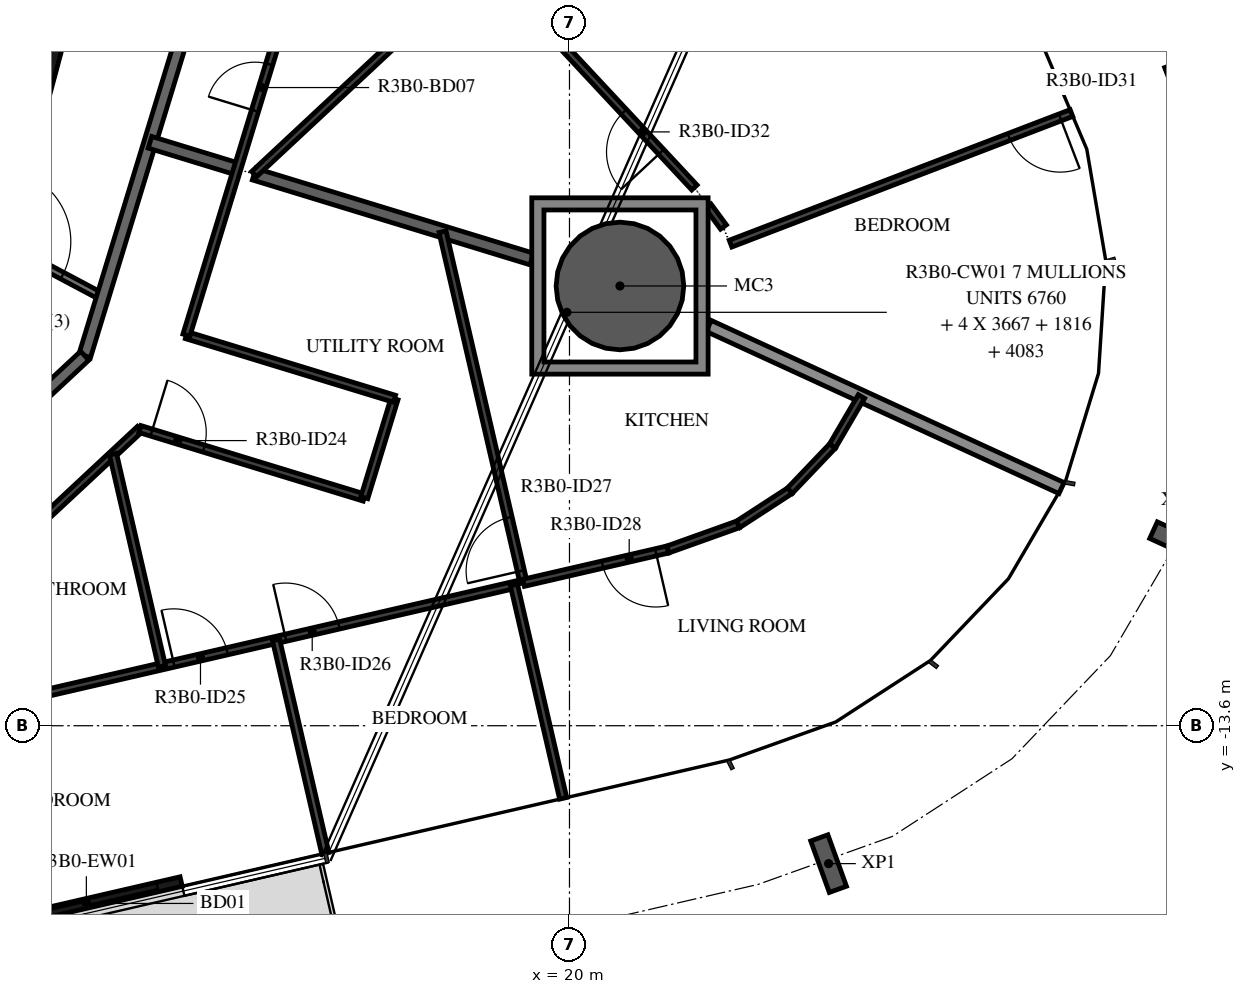
"""IFC4 building model, lengths in metres.
Left out: names, types, materials, properties, quantities, classifications, styles, units other than length and angle.
Written with IfcOpenShell. Run it as: python <this file> out.ifc"""

import sys

from ifc_helpers import new_model, si_unit, direction, frame, frame_2d, origin, origin_2d, place, context, subcontext, project, spatial, polyline, rectangle, hollow_circle, i_section, outline, extrude, element, fill, save


model = new_model("IFC4")
c1 = context("Model", 3, precision=1e-05, world=origin(), true_north=direction((0.0, 1.0)))
c2 = subcontext(c1, "Body", "Model", "MODEL_VIEW")
j1 = project(units=[si_unit("LENGTHUNIT", "METRE"), si_unit("PLANEANGLEUNIT", "RADIAN")], contexts=[c1])
p1 = place(None, origin())
s1 = spatial("IfcSite", under=j1, at=p1, CompositionType="ELEMENT")
p2 = place(p1, origin())
s2 = spatial("IfcBuilding", under=s1, at=p2, CompositionType="ELEMENT")
p3 = place(p2, frame((0.0, 0.0, 127.4)))
s3 = spatial("IfcBuildingStorey", under=s2, at=p3, CompositionType="ELEMENT", Elevation=127.4)
p4 = place(p3, frame((20.83, -6.368, -0.38), z_axis=(0.0, 0.0, 1.0), x_axis=(1.0, 0.0, 0.0)))
e1 = element("IfcColumn", 1, at=p4, inside=s3, PredefinedType="COLUMN", context=c2, shape_type="SweptSolid", body=[
    extrude(hollow_circle(Radius=1.05, WallThickness=0.05, at=origin_2d()), origin(), (0.0, 0.0, 1.0), 3.5),
])
for number, where, z_axis, x_axis in (
    (2, (24.261, -15.868, -0.38), (0.0, 0.0, 1.0), (-0.941, -0.34, 0.0)),
    (3, (30.014, -10.571, -0.38), (0.0, 0.0, 1.0), (-0.416, -0.909, 0.0)),
    (4, (30.262, -2.756, -0.38), (0.0, 0.0, 1.0), (0.358, -0.934, 0.0)),
):
    element("IfcColumn", number, at=place(p3, frame(where, z_axis=z_axis, x_axis=x_axis)), inside=s3, PredefinedType="COLUMN", context=c2, shape_type="SweptSolid", body=[
        extrude(i_section(OverallWidth=0.3, OverallDepth=0.9, WebThickness=0.019, FlangeThickness=0.035, FilletRadius=0.03, at=origin_2d()), origin(), (0.0, 0.0, 1.0), 3.5),
    ])
p5 = place(p3, frame((10.496, -16.883, 0.0), z_axis=(0.0, 0.0, 1.0), x_axis=(0.974364187477, 0.224976510247, 0.0)))
e5 = element("IfcWall", 5, at=p5, inside=s3, PredefinedType="STANDARD", context=c2, shape_type="SweptSolid", body=[
    extrude(rectangle(XDim=3.2, YDim=0.16, at=frame_2d((1.6, 0.0))), origin(), (0.0, 0.0, 1.0), 3.12),
])
p6 = place(p5, frame((0.4, 0.0, 0.0)))
e6 = element("IfcOpeningElement", 6, at=p6, cuts=e5, PredefinedType="OPENING", context=c2, shape_type="SweptSolid", body=[
    extrude(rectangle(XDim=2.4, YDim=2.4, at=frame_2d((1.2, 1.2))), frame((0.0, 0.09, 0.0), z_axis=(0.0, -1.0, 0.0), x_axis=(1.0, 0.0, 0.0)), (0.0, 0.0, 1.0), 0.18),
])
p7 = place(p3, frame((10.858, -4.479, 0.0), z_axis=(0.0, 0.0, 1.0), x_axis=(0.258734743916, 0.965948410781, 0.0)))
e7 = element("IfcWall", 7, at=p7, inside=s3, PredefinedType="SHEAR", context=c2, shape_type="SweptSolid", body=[
    extrude(rectangle(XDim=3.033, YDim=0.5, at=frame_2d((1.516, 0.0))), origin(), (0.0, 0.0, 1.0), 3.12),
])
p8 = place(p3, frame((10.511, -5.589, 0.0), z_axis=(0.0, 0.0, 1.0), x_axis=(0.882987820808, -0.469395897196, 0.0)))
e8 = element("IfcWall", 8, at=p8, inside=s3, PredefinedType="PARTITIONING", context=c2, shape_type="SweptSolid", body=[
    extrude(rectangle(XDim=2.052, YDim=0.12, at=frame_2d((1.026, 0.0))), origin(), (0.0, 0.0, 1.0), 3.12),
])
p9 = place(p8, frame((0.1, 0.0, 0.0)))
e9 = element("IfcOpeningElement", 9, at=p9, cuts=e8, PredefinedType="OPENING", context=c2, shape_type="SweptSolid", body=[
    extrude(rectangle(XDim=1.2, YDim=2.1, at=frame_2d((0.6, 1.05))), frame((0.0, 0.07, 0.0), z_axis=(0.0, -1.0, 0.0), x_axis=(1.0, 0.0, 0.0)), (0.0, 0.0, 1.0), 0.14),
])
p10 = place(p3, frame((12.028, -7.516, 0.0), z_axis=(0.0, 0.0, 1.0), x_axis=(0.292365533182, 0.956306642771, 0.0)))
e10 = element("IfcWall", 10, at=p10, inside=s3, PredefinedType="STANDARD", context=c2, shape_type="SweptSolid", body=[
    extrude(rectangle(XDim=7.342, YDim=0.2, at=frame_2d((3.671, 0.0))), origin(), (0.0, 0.0, 1.0), 3.12),
])
p11 = place(p3, frame((6.659, -12.523, 0.0), z_axis=(0.0, 0.0, 1.0), x_axis=(0.731350455479, 0.682001841105, 0.0)))
e11 = element("IfcWall", 11, at=p11, inside=s3, PredefinedType="STANDARD", context=c2, shape_type="SweptSolid", body=[
    extrude(rectangle(XDim=7.342, YDim=0.2, at=frame_2d((3.671, 0.0))), origin(), (0.0, 0.0, 1.0), 3.12),
])
p12 = place(p11, frame((0.597, 0.0, 0.0)))
e12 = element("IfcOpeningElement", 12, at=p12, cuts=e11, PredefinedType="OPENING", context=c2, shape_type="SweptSolid", body=[
    extrude(rectangle(XDim=1.0, YDim=2.1, at=frame_2d((0.5, 1.05))), frame((0.0, 0.11, 0.0), z_axis=(0.0, -1.0, 0.0), x_axis=(1.0, 0.0, 0.0)), (0.0, 0.0, 1.0), 0.22),
])
p13 = place(p3, frame((14.536, -4.444, 0.0), z_axis=(0.0, 0.0, 1.0), x_axis=(-0.956326299111, 0.292301230974, 0.0)))
e13 = element("IfcWall", 13, at=p13, inside=s3, PredefinedType="STANDARD", context=c2, shape_type="SweptSolid", body=[
    extrude(rectangle(XDim=1.5, YDim=0.2, at=frame_2d((0.75, 0.0))), origin(), (0.0, 0.0, 1.0), 3.12),
])
p14 = place(p3, frame((19.38, -5.925, 0.0), z_axis=(0.0, 0.0, 1.0), x_axis=(-0.956301542054, 0.29238221674, 0.0)))
e14 = element("IfcWall", 14, at=p14, inside=s3, PredefinedType="STANDARD", context=c2, shape_type="SweptSolid", body=[
    extrude(rectangle(XDim=4.775, YDim=0.2, at=frame_2d((2.387, 0.0))), origin(), (0.0, 0.0, 1.0), 3.12),
])
p15 = place(p3, frame((28.092, -9.692, 0.0), z_axis=(0.0, 0.0, 1.0), x_axis=(-0.908656456134, 0.417544542206, 0.0)))
e15 = element("IfcWall", 15, at=p15, inside=s3, PredefinedType="STANDARD", context=c2, shape_type="SweptSolid", body=[
    extrude(rectangle(XDim=6.385, YDim=0.2, at=frame_2d((3.192, 0.0))), origin(), (0.0, 0.0, 1.0), 2.73),
])
p16 = place(p3, frame((-13.939, -18.911, 0.0), z_axis=(0.0, 0.0, 1.0), x_axis=(0.974369607456, 0.224953035245, 0.0)))
e16 = element("IfcWall", 16, at=p16, inside=s3, PredefinedType="PARTITIONING", context=c2, shape_type="SweptSolid", body=[
    extrude(rectangle(XDim=33.934, YDim=0.12, at=frame_2d((16.967, 0.0))), origin(), (0.0, 0.0, 1.0), 3.12),
])
p17 = place(p16, frame((2.0, 0.0, 0.0)))
e17 = element("IfcOpeningElement", 17, at=p17, cuts=e16, PredefinedType="OPENING", context=c2, shape_type="SweptSolid", body=[
    extrude(rectangle(XDim=0.9, YDim=2.1, at=frame_2d((0.45, 1.05))), frame((0.0, 0.07, 0.0), z_axis=(0.0, -1.0, 0.0), x_axis=(1.0, 0.0, 0.0)), (0.0, 0.0, 1.0), 0.14),
])
p18 = place(p16, frame((28.154, 0.0, 0.0)))
e18 = element("IfcOpeningElement", 18, at=p18, cuts=e16, PredefinedType="OPENING", context=c2, shape_type="SweptSolid", body=[
    extrude(rectangle(XDim=0.9, YDim=2.1, at=frame_2d((0.45, 1.05))), frame((0.0, 0.07, 0.0), z_axis=(0.0, -1.0, 0.0), x_axis=(1.0, 0.0, 0.0)), (0.0, 0.0, 1.0), 0.14),
])
p19 = place(p16, frame((30.039, 0.0, 0.0)))
e19 = element("IfcOpeningElement", 19, at=p19, cuts=e16, PredefinedType="OPENING", context=c2, shape_type="SweptSolid", body=[
    extrude(rectangle(XDim=0.9, YDim=2.1, at=frame_2d((0.45, 1.05))), frame((0.0, 0.07, 0.0), z_axis=(0.0, -1.0, 0.0), x_axis=(1.0, 0.0, 0.0)), (0.0, 0.0, 1.0), 0.14),
])
p20 = place(p3, frame((7.388, -13.894, 0.0), z_axis=(0.0, 0.0, 1.0), x_axis=(0.731346321845, 0.682006273815, 0.0)))
e20 = element("IfcWall", 20, at=p20, inside=s3, PredefinedType="PARTITIONING", context=c2, shape_type="SweptSolid", body=[
    extrude(rectangle(XDim=7.585, YDim=0.12, at=frame_2d((3.793, 0.0))), origin(), (0.0, 0.0, 1.0), 3.12),
])
p21 = place(p20, frame((1.3, 0.0, 0.0)))
e21 = element("IfcOpeningElement", 21, at=p21, cuts=e20, PredefinedType="OPENING", context=c2, shape_type="SweptSolid", body=[
    extrude(rectangle(XDim=0.8, YDim=2.1, at=frame_2d((0.4, 1.05))), frame((0.0, 0.07, 0.0), z_axis=(0.0, -1.0, 0.0), x_axis=(1.0, 0.0, 0.0)), (0.0, 0.0, 1.0), 0.14),
])
p22 = place(p3, frame((12.935, -8.721, 0.0), z_axis=(0.0, 0.0, 1.0), x_axis=(0.956306865441, -0.292364804843, 0.0)))
e22 = element("IfcWall", 22, at=p22, inside=s3, PredefinedType="PARTITIONING", context=c2, shape_type="SweptSolid", body=[
    extrude(rectangle(XDim=3.859, YDim=0.12, at=frame_2d((1.929, 0.0))), origin(), (0.0, 0.0, 1.0), 3.12),
])
p23 = place(p22, frame((0.2, 0.0, 0.0)))
e23 = element("IfcOpeningElement", 23, at=p23, cuts=e22, PredefinedType="OPENING", context=c2, shape_type="SweptSolid", body=[
    extrude(rectangle(XDim=0.9, YDim=2.1, at=frame_2d((0.45, 1.05))), frame((0.0, 0.07, 0.0), z_axis=(0.0, -1.0, 0.0), x_axis=(1.0, 0.0, 0.0)), (0.0, 0.0, 1.0), 0.14),
])
p24 = place(p3, frame((16.625, -9.849, 0.0), z_axis=(0.0, 0.0, 1.0), x_axis=(0.292390011609, 0.956299158795, 0.0)))
e24 = element("IfcWall", 24, at=p24, inside=s3, PredefinedType="PARTITIONING", context=c2, shape_type="SweptSolid", body=[
    extrude(rectangle(XDim=1.7, YDim=0.12, at=frame_2d((0.85, 0.0))), origin(), (0.0, 0.0, 1.0), 3.12),
])
p25 = place(p3, frame((17.123, -8.223, 0.0), z_axis=(0.0, 0.0, 1.0), x_axis=(-0.956299657224, 0.292388381428, 0.0)))
e25 = element("IfcWall", 25, at=p25, inside=s3, PredefinedType="PARTITIONING", context=c2, shape_type="SweptSolid", body=[
    extrude(rectangle(XDim=3.579, YDim=0.12, at=frame_2d((1.79, 0.0))), origin(), (0.0, 0.0, 1.0), 3.12),
])
p26 = place(p3, frame((13.7, -7.177, 0.0), z_axis=(0.0, 0.0, 1.0), x_axis=(0.292382309758, 0.956301513614, 0.0)))
e26 = element("IfcWall", 26, at=p26, inside=s3, PredefinedType="PARTITIONING", context=c2, shape_type="SweptSolid", body=[
    extrude(rectangle(XDim=6.93, YDim=0.12, at=frame_2d((3.465, 0.0))), origin(), (0.0, 0.0, 1.0), 3.12),
])
p27 = place(p26, frame((3.858, 0.0, 0.0)))
e27 = element("IfcOpeningElement", 27, at=p27, cuts=e26, PredefinedType="OPENING", context=c2, shape_type="SweptSolid", body=[
    extrude(rectangle(XDim=0.8, YDim=2.1, at=frame_2d((0.4, 1.05))), frame((0.0, 0.07, 0.0), z_axis=(0.0, -1.0, 0.0), x_axis=(1.0, 0.0, 0.0)), (0.0, 0.0, 1.0), 0.14),
])
p28 = place(p3, frame((15.985, -15.698, 0.0), z_axis=(0.0, 0.0, 1.0), x_axis=(-0.224943703639, 0.9743717618, 0.0)))
e28 = element("IfcWall", 28, at=p28, inside=s3, PredefinedType="PARTITIONING", context=c2, shape_type="SweptSolid", body=[
    extrude(rectangle(XDim=3.6, YDim=0.12, at=frame_2d((1.8, 0.0))), origin(), (0.0, 0.0, 1.0), 2.73),
])
p29 = place(p3, frame((13.298, -12.623, 0.0), z_axis=(0.0, 0.0, 1.0), x_axis=(-0.22499394936, 0.974360160696, 0.0)))
e29 = element("IfcWall", 29, at=p29, inside=s3, PredefinedType="PARTITIONING", context=c2, shape_type="SweptSolid", body=[
    extrude(rectangle(XDim=3.581, YDim=0.12, at=frame_2d((1.791, 0.0))), origin(), (0.0, 0.0, 1.0), 3.12),
])
p30 = place(p3, frame((19.896, -14.794, 0.0), z_axis=(0.0, 0.0, 1.0), x_axis=(-0.224958568294, 0.974368330023, 0.0)))
e30 = element("IfcWall", 30, at=p30, inside=s3, PredefinedType="PARTITIONING", context=c2, shape_type="SweptSolid", body=[
    extrude(rectangle(XDim=3.6, YDim=0.12, at=frame_2d((1.8, 0.0))), origin(), (0.0, 0.0, 1.0), 3.12),
])
p31 = place(p3, frame((19.245, -11.25, 0.0), z_axis=(0.0, 0.0, 1.0), x_axis=(-0.224958805164, 0.974368275335, 0.0)))
e31 = element("IfcWall", 31, at=p31, inside=s3, PredefinedType="PARTITIONING", context=c2, shape_type="SweptSolid", body=[
    extrude(rectangle(XDim=5.926, YDim=0.12, at=frame_2d((2.963, 0.0))), origin(), (0.0, 0.0, 1.0), 3.12),
])
p32 = place(p31, frame((0.2, 0.0, 0.0)))
e32 = element("IfcOpeningElement", 32, at=p32, cuts=e31, PredefinedType="OPENING", context=c2, shape_type="SweptSolid", body=[
    extrude(rectangle(XDim=0.9, YDim=2.1, at=frame_2d((0.45, 1.05))), frame((0.0, 0.07, 0.0), z_axis=(0.0, -1.0, 0.0), x_axis=(1.0, 0.0, 0.0)), (0.0, 0.0, 1.0), 0.14),
])
p33 = place(p3, frame((24.802, -8.186, 0.0), z_axis=(0.0, 0.0, 1.0), x_axis=(-0.505043103481, -0.863094122113, 0.0)))
e33 = element("IfcWall", 33, at=p33, inside=s3, PredefinedType="PARTITIONING", context=c2, shape_type="SweptSolid", body=[
    extrude(rectangle(XDim=0.945, YDim=0.12, at=frame_2d((0.473, 0.0))), origin(), (0.0, 0.0, 1.0), 3.12),
])
for number, where, z_axis, x_axis in (
    (34, (24.324, -9.002, 0.0), (0.0, 0.0, 1.0), (-0.69, -0.723, 0.0)),
    (35, (23.623, -9.737, 0.0), (0.0, 0.0, 1.0), (-0.839, -0.545, 0.0)),
):
    element("IfcWall", number, at=place(p3, frame(where, z_axis=z_axis, x_axis=x_axis)), inside=s3, PredefinedType="PARTITIONING", context=c2, shape_type="SweptSolid", body=[
        extrude(rectangle(XDim=1.016, YDim=0.12, at=frame_2d((0.508, 0.0))), origin(), (0.0, 0.0, 1.0), 3.12),
    ])
p34 = place(p3, frame((22.771, -10.29, 0.0), z_axis=(0.0, 0.0, 1.0), x_axis=(-0.941701391526, -0.336449831623, 0.0)))
e36 = element("IfcWall", 36, at=p34, inside=s3, PredefinedType="PARTITIONING", context=c2, shape_type="SweptSolid", body=[
    extrude(rectangle(XDim=1.227, YDim=0.12, at=frame_2d((0.614, 0.0))), origin(), (0.0, 0.0, 1.0), 3.12),
])
p35 = place(p3, frame((21.615, -10.703, 0.0), z_axis=(0.0, 0.0, 1.0), x_axis=(-0.974359049184, -0.224998762825, 0.0)))
e37 = element("IfcWall", 37, at=p35, inside=s3, PredefinedType="PARTITIONING", context=c2, shape_type="SweptSolid", body=[
    extrude(rectangle(XDim=2.433, YDim=0.12, at=frame_2d((1.216, 0.0))), origin(), (0.0, 0.0, 1.0), 3.12),
])
p36 = place(p35, frame((0.2, 0.0, 0.0)))
e38 = element("IfcOpeningElement", 38, at=p36, cuts=e37, PredefinedType="OPENING", context=c2, shape_type="SweptSolid", body=[
    extrude(rectangle(XDim=0.9, YDim=2.1, at=frame_2d((0.45, 1.05))), frame((0.0, 0.07, 0.0), z_axis=(0.0, -1.0, 0.0), x_axis=(1.0, 0.0, 0.0)), (0.0, 0.0, 1.0), 0.14),
])
p37 = place(p3, frame((28.255, -3.525, 0.0), z_axis=(0.0, 0.0, 1.0), x_axis=(-0.933839412031, -0.357692539114, 0.0)))
e39 = element("IfcWall", 39, at=p37, inside=s3, PredefinedType="PARTITIONING", context=c2, shape_type="SweptSolid", body=[
    extrude(rectangle(XDim=6.004, YDim=0.12, at=frame_2d((3.002, 0.0))), origin(), (0.0, 0.0, 1.0), 2.73),
])
p38 = place(p37, frame((0.2, 0.0, 0.0)))
e40 = element("IfcOpeningElement", 40, at=p38, cuts=e39, PredefinedType="OPENING", context=c2, shape_type="SweptSolid", body=[
    extrude(rectangle(XDim=0.9, YDim=2.1, at=frame_2d((0.45, 1.05))), frame((0.0, 0.07, 0.0), z_axis=(0.0, -1.0, 0.0), x_axis=(1.0, 0.0, 0.0)), (0.0, 0.0, 1.0), 0.14),
])
p39 = place(p3, frame((22.532, -5.399, 0.0), z_axis=(0.0, 0.0, 1.0), x_axis=(-0.592456078431, 0.805602752683, 0.0)))
e41 = element("IfcWall", 41, at=p39, inside=s3, PredefinedType="PARTITIONING", context=c2, shape_type="SweptSolid", body=[
    extrude(rectangle(XDim=0.426, YDim=0.12, at=frame_2d((0.213, 0.0))), origin(), (0.0, 0.0, 1.0), 3.12),
])
p40 = place(p3, frame((18.577, -1.02, 0.0), z_axis=(0.0, 0.0, 1.0), x_axis=(-0.731348673524, -0.682003751994, 0.0)))
e42 = element("IfcWall", 42, at=p40, inside=s3, PredefinedType="PARTITIONING", context=c2, shape_type="SweptSolid", body=[
    extrude(rectangle(XDim=5.146, YDim=0.12, at=frame_2d((2.573, 0.0))), origin(), (0.0, 0.0, 1.0), 3.12),
])
p41 = place(p3, frame((22.054, -4.749, 0.0), z_axis=(0.0, 0.0, 1.0), x_axis=(-0.682014558945, 0.731338595582, 0.0)))
e43 = element("IfcWall", 43, at=p41, inside=s3, PredefinedType="PARTITIONING", context=c2, shape_type="SweptSolid", body=[
    extrude(rectangle(XDim=10.399, YDim=0.12, at=frame_2d((5.2, 0.0))), origin(), (0.0, 0.0, 1.0), 3.12),
])
p42 = place(p41, frame((0.8, 0.0, 0.0)))
e44 = element("IfcOpeningElement", 44, at=p42, cuts=e43, PredefinedType="OPENING", context=c2, shape_type="SweptSolid", body=[
    extrude(rectangle(XDim=0.9, YDim=2.1, at=frame_2d((0.45, 1.05))), frame((0.0, 0.07, 0.0), z_axis=(0.0, -1.0, 0.0), x_axis=(1.0, 0.0, 0.0)), (0.0, 0.0, 1.0), 0.14),
])
p43 = place(p3, origin())
e45 = element("IfcWall", 45, at=p43, inside=s3, PredefinedType="STANDARD", context=c2, shape_type="SweptSolid", body=[
    extrude(outline(polyline([(22.28, -4.918), (22.28, -7.818), (19.38, -7.818), (19.38, -4.918), (22.28, -4.918)]), holes=[polyline([(19.58, -7.618), (22.08, -7.618), (22.08, -5.118), (19.58, -5.118), (19.58, -7.618)])]), origin(), (0.0, 0.0, 1.0), 3.12),
])
p44 = place(p6, origin())
e46 = element("IfcDoor", 46, at=p44, inside=s3, OperationType="DOUBLE_DOOR_SLIDING", PredefinedType="DOOR", context=c2, shape_type="SweptSolid", body=[
    extrude(rectangle(XDim=2.4, YDim=2.4, at=frame_2d((1.2, 1.2))), frame((0.0, 0.025, 0.0), z_axis=(0.0, -1.0, 0.0), x_axis=(1.0, 0.0, 0.0)), (0.0, 0.0, 1.0), 0.05),
])
fill(e6, e46)
p45 = place(p23, origin())
e47 = element("IfcDoor", 47, at=p45, inside=s3, OperationType="SINGLE_SWING_RIGHT", PredefinedType="DOOR", context=c2, shape_type="SweptSolid", body=[
    extrude(rectangle(XDim=0.9, YDim=2.1, at=frame_2d((0.45, 1.05))), frame((0.0, 0.025, 0.0), z_axis=(0.0, -1.0, 0.0), x_axis=(1.0, 0.0, 0.0)), (0.0, 0.0, 1.0), 0.05),
])
fill(e23, e47)
p46 = place(p18, origin())
e48 = element("IfcDoor", 48, at=p46, inside=s3, OperationType="SINGLE_SWING_RIGHT", PredefinedType="DOOR", context=c2, shape_type="SweptSolid", body=[
    extrude(rectangle(XDim=0.9, YDim=2.1, at=frame_2d((0.45, 1.05))), frame((0.0, 0.025, 0.0), z_axis=(0.0, -1.0, 0.0), x_axis=(1.0, 0.0, 0.0)), (0.0, 0.0, 1.0), 0.05),
])
fill(e18, e48)
p47 = place(p19, origin())
e49 = element("IfcDoor", 49, at=p47, inside=s3, OperationType="SINGLE_SWING_RIGHT", PredefinedType="DOOR", context=c2, shape_type="SweptSolid", body=[
    extrude(rectangle(XDim=0.9, YDim=2.1, at=frame_2d((0.45, 1.05))), frame((0.0, 0.025, 0.0), z_axis=(0.0, -1.0, 0.0), x_axis=(1.0, 0.0, 0.0)), (0.0, 0.0, 1.0), 0.05),
])
fill(e19, e49)
p48 = place(p32, origin())
e50 = element("IfcDoor", 50, at=p48, inside=s3, OperationType="SINGLE_SWING_RIGHT", PredefinedType="DOOR", context=c2, shape_type="SweptSolid", body=[
    extrude(rectangle(XDim=0.9, YDim=2.1, at=frame_2d((0.45, 1.05))), frame((0.0, 0.025, 0.0), z_axis=(0.0, -1.0, 0.0), x_axis=(1.0, 0.0, 0.0)), (0.0, 0.0, 1.0), 0.05),
])
fill(e32, e50)
p49 = place(p36, origin())
e51 = element("IfcDoor", 51, at=p49, inside=s3, OperationType="SINGLE_SWING_RIGHT", PredefinedType="DOOR", context=c2, shape_type="SweptSolid", body=[
    extrude(rectangle(XDim=0.9, YDim=2.1, at=frame_2d((0.45, 1.05))), frame((0.0, 0.025, 0.0), z_axis=(0.0, -1.0, 0.0), x_axis=(1.0, 0.0, 0.0)), (0.0, 0.0, 1.0), 0.05),
])
fill(e38, e51)
p50 = place(p27, origin())
e52 = element("IfcDoor", 52, at=p50, inside=s3, OperationType="SINGLE_SWING_LEFT", PredefinedType="DOOR", context=c2, shape_type="SweptSolid", body=[
    extrude(rectangle(XDim=0.8, YDim=2.1, at=frame_2d((0.4, 1.05))), frame((0.0, 0.025, 0.0), z_axis=(0.0, -1.0, 0.0), x_axis=(1.0, 0.0, 0.0)), (0.0, 0.0, 1.0), 0.05),
])
fill(e27, e52)
p51 = place(p38, origin())
e53 = element("IfcDoor", 53, at=p51, inside=s3, OperationType="SINGLE_SWING_LEFT", PredefinedType="DOOR", context=c2, shape_type="SweptSolid", body=[
    extrude(rectangle(XDim=0.9, YDim=2.1, at=frame_2d((0.45, 1.05))), frame((0.0, 0.025, 0.0), z_axis=(0.0, -1.0, 0.0), x_axis=(1.0, 0.0, 0.0)), (0.0, 0.0, 1.0), 0.05),
])
fill(e40, e53)
p52 = place(p42, origin())
e54 = element("IfcDoor", 54, at=p52, inside=s3, OperationType="SINGLE_SWING_RIGHT", PredefinedType="DOOR", context=c2, shape_type="SweptSolid", body=[
    extrude(rectangle(XDim=0.9, YDim=2.1, at=frame_2d((0.45, 1.05))), frame((0.0, 0.025, 0.0), z_axis=(0.0, -1.0, 0.0), x_axis=(1.0, 0.0, 0.0)), (0.0, 0.0, 1.0), 0.05),
])
fill(e44, e54)
p53 = place(p9, origin())
e55 = element("IfcDoor", 55, at=p53, inside=s3, OperationType="DOUBLE_DOOR_SINGLE_SWING", PredefinedType="DOOR", context=c2, shape_type="SweptSolid", body=[
    extrude(rectangle(XDim=1.2, YDim=2.1, at=frame_2d((0.6, 1.05))), frame((0.0, 0.025, 0.0), z_axis=(0.0, -1.0, 0.0), x_axis=(1.0, 0.0, 0.0)), (0.0, 0.0, 1.0), 0.05),
])
fill(e9, e55)
save(model, sys.argv[1])
